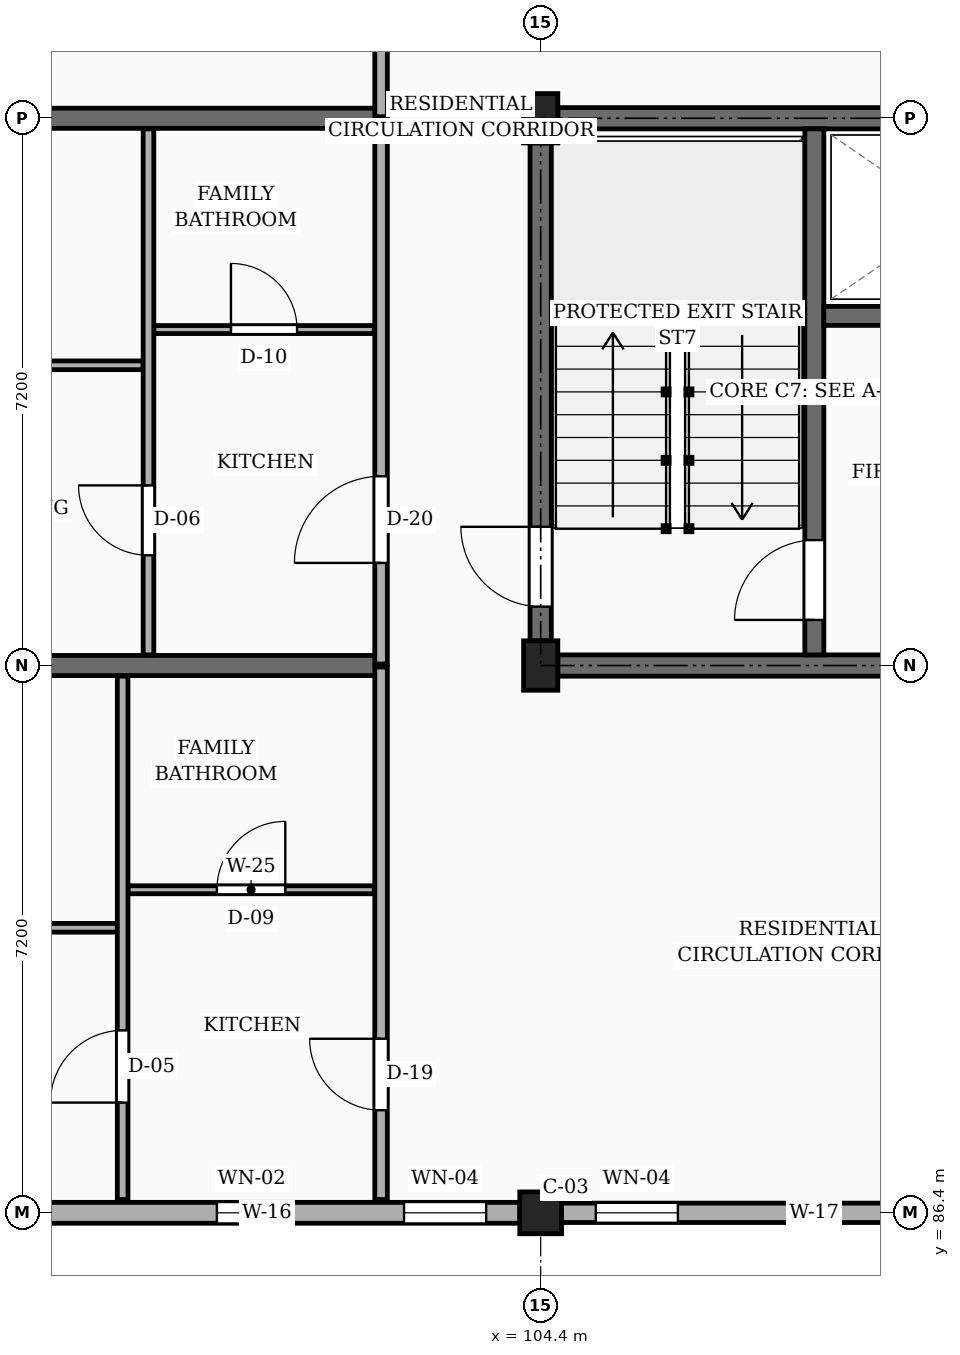
"""IFC4 building model, lengths in metres.
Left out: names, types, materials, properties, quantities, classifications, styles, units other than length and angle.
Written with IfcOpenShell. Run it as: python <this file> out.ifc"""

import sys

from ifc_helpers import new_model, si_unit, direction, frame, frame_2d, origin, origin_2d, place, context, subcontext, project, spatial, rectangle, extrude, element, fill, save


model = new_model("IFC4")
c1 = context("Model", 3, precision=1e-05, world=origin(), true_north=direction((0.0, 1.0)))
c2 = subcontext(c1, "Body", "Model", "MODEL_VIEW")
j1 = project(units=[si_unit("LENGTHUNIT", "METRE"), si_unit("PLANEANGLEUNIT", "RADIAN")], contexts=[c1])
p1 = place(None, origin())
s1 = spatial("IfcSite", under=j1, at=p1, CompositionType="ELEMENT")
p2 = place(p1, origin())
s2 = spatial("IfcBuilding", under=s1, at=p2, CompositionType="ELEMENT")
p3 = place(p2, frame((0.0, 0.0, 10.8)))
s3 = spatial("IfcBuildingStorey", under=s2, at=p3, CompositionType="ELEMENT", Elevation=10.8)
p4 = place(p3, frame((104.4, 86.4, 0.0), z_axis=(0.0, 0.0, 1.0), x_axis=(1.0, 0.0, 0.0)))
e1 = element("IfcColumn", 1, at=p4, inside=s3, PredefinedType="COLUMN", context=c2, shape_type="SweptSolid", body=[
    extrude(rectangle(XDim=0.55, YDim=0.55, at=origin_2d()), origin(), (0.0, 0.0, 1.0), 3.15),
])
for number, where, z_axis, x_axis in (
    (2, (104.4, 93.6, 0.0), (0.0, 0.0, 1.0), (1.0, 0.0, 0.0)),
    (3, (104.4, 100.8, 0.0), (0.0, 0.0, 1.0), (1.0, 0.0, 0.0)),
):
    element("IfcColumn", number, at=place(p3, frame(where, z_axis=z_axis, x_axis=x_axis)), inside=s3, PredefinedType="COLUMN", context=c2, shape_type="SweptSolid", body=[
        extrude(rectangle(XDim=0.45, YDim=0.65, at=origin_2d()), origin(), (0.0, 0.0, 1.0), 3.15),
    ])
for number, where, z_axis, x_axis in (
    (4, (90.275, 93.6, 0.0), (0.0, 0.0, 1.0), (1.0, 0.0, 0.0)),
    (5, (90.275, 100.8, 0.0), (0.0, 0.0, 1.0), (1.0, 0.0, 0.0)),
):
    element("IfcWall", number, at=place(p3, frame(where, z_axis=z_axis, x_axis=x_axis)), inside=s3, PredefinedType="SOLIDWALL", context=c2, shape_type="SweptSolid", body=[
        extrude(rectangle(XDim=12.025, YDim=0.265, at=frame_2d((6.013, 0.0))), origin(), (0.0, 0.0, 1.0), 2.19),
    ])
p5 = place(p3, frame((97.475, 86.4, 0.0), z_axis=(0.0, 0.0, 1.0), x_axis=(1.0, 0.0, 0.0)))
e6 = element("IfcWall", 6, at=p5, inside=s3, PredefinedType="SOLIDWALL", context=c2, shape_type="SweptSolid", body=[
    extrude(rectangle(XDim=6.65, YDim=0.275, at=frame_2d((3.325, 0.0))), origin(), (0.0, 0.0, 1.0), 2.46),
])
p6 = place(p5, frame((2.665, 0.0, 0.78)))
e7 = element("IfcOpeningElement", 7, at=p6, cuts=e6, PredefinedType="OPENING", context=c2, shape_type="SweptSolid", body=[
    extrude(rectangle(XDim=0.92, YDim=1.15, at=frame_2d((0.46, 0.575))), frame((0.0, 0.147, 0.0), z_axis=(0.0, -1.0, 0.0), x_axis=(1.0, 0.0, 0.0)), (0.0, 0.0, 1.0), 0.295),
])
p7 = place(p5, frame((5.127, 0.0, 0.78)))
e8 = element("IfcOpeningElement", 8, at=p7, cuts=e6, PredefinedType="OPENING", context=c2, shape_type="SweptSolid", body=[
    extrude(rectangle(XDim=1.08, YDim=1.15, at=frame_2d((0.54, 0.575))), frame((0.0, 0.147, 0.0), z_axis=(0.0, -1.0, 0.0), x_axis=(1.0, 0.0, 0.0)), (0.0, 0.0, 1.0), 0.295),
])
p8 = place(p3, frame((104.675, 86.4, 0.0), z_axis=(0.0, 0.0, 1.0), x_axis=(1.0, 0.0, 0.0)))
e9 = element("IfcWall", 9, at=p8, inside=s3, PredefinedType="SOLIDWALL", context=c2, shape_type="SweptSolid", body=[
    extrude(rectangle(XDim=6.65, YDim=0.255, at=frame_2d((3.325, 0.0))), origin(), (0.0, 0.0, 1.0), 2.46),
])
p9 = place(p8, frame((0.45, 0.0, 0.78)))
e10 = element("IfcOpeningElement", 10, at=p9, cuts=e9, PredefinedType="OPENING", context=c2, shape_type="SweptSolid", body=[
    extrude(rectangle(XDim=1.08, YDim=1.15, at=frame_2d((0.54, 0.575))), frame((0.0, 0.137, 0.0), z_axis=(0.0, -1.0, 0.0), x_axis=(1.0, 0.0, 0.0)), (0.0, 0.0, 1.0), 0.275),
])
p10 = place(p8, frame((4.65, 0.0, 0.78)))
e11 = element("IfcOpeningElement", 11, at=p10, cuts=e9, PredefinedType="OPENING", context=c2, shape_type="SweptSolid", body=[
    extrude(rectangle(XDim=1.24, YDim=1.15, at=frame_2d((0.62, 0.575))), frame((0.0, 0.137, 0.0), z_axis=(0.0, -1.0, 0.0), x_axis=(1.0, 0.0, 0.0)), (0.0, 0.0, 1.0), 0.275),
])
p11 = place(p3, frame((104.4, 93.925, 0.0), z_axis=(0.0, 0.0, 1.0), x_axis=(0.0, 1.0, 0.0)))
e12 = element("IfcWall", 12, at=p11, inside=s3, PredefinedType="SHEAR", context=c2, shape_type="SweptSolid", body=[
    extrude(rectangle(XDim=6.55, YDim=0.28, at=frame_2d((3.275, 0.0))), origin(), (0.0, 0.0, 1.0), 2.89),
])
p12 = place(p11, frame((0.45, 0.0, 0.0)))
e13 = element("IfcOpeningElement", 13, at=p12, cuts=e12, PredefinedType="OPENING", context=c2, shape_type="SweptSolid", body=[
    extrude(rectangle(XDim=1.05, YDim=2.15, at=frame_2d((0.525, 1.075))), frame((0.0, 0.15, 0.0), z_axis=(0.0, -1.0, 0.0), x_axis=(1.0, 0.0, 0.0)), (0.0, 0.0, 1.0), 0.3),
])
p13 = place(p3, frame((104.625, 100.8, 0.0), z_axis=(0.0, 0.0, 1.0), x_axis=(1.0, 0.0, 0.0)))
e14 = element("IfcWall", 14, at=p13, inside=s3, PredefinedType="SHEAR", context=c2, shape_type="SweptSolid", body=[
    extrude(rectangle(XDim=6.75, YDim=0.28, at=frame_2d((3.375, 0.0))), origin(), (0.0, 0.0, 1.0), 2.89),
])
p14 = place(p3, frame((104.625, 93.6, 0.0), z_axis=(0.0, 0.0, 1.0), x_axis=(1.0, 0.0, 0.0)))
e15 = element("IfcWall", 15, at=p14, inside=s3, PredefinedType="SHEAR", context=c2, shape_type="SweptSolid", body=[
    extrude(rectangle(XDim=6.75, YDim=0.28, at=frame_2d((3.375, 0.0))), origin(), (0.0, 0.0, 1.0), 2.89),
])
p15 = place(p14, frame((4.525, 0.0, 0.0)))
e16 = element("IfcOpeningElement", 16, at=p15, cuts=e15, PredefinedType="OPENING", context=c2, shape_type="SweptSolid", body=[
    extrude(rectangle(XDim=1.1, YDim=2.15, at=frame_2d((0.55, 1.075))), frame((0.0, 0.15, 0.0), z_axis=(0.0, -1.0, 0.0), x_axis=(1.0, 0.0, 0.0)), (0.0, 0.0, 1.0), 0.3),
])
p16 = place(p3, frame((108.0, 93.74, 0.0), z_axis=(0.0, 0.0, 1.0), x_axis=(0.0, 1.0, 0.0)))
e17 = element("IfcWall", 17, at=p16, inside=s3, PredefinedType="SHEAR", context=c2, shape_type="SweptSolid", body=[
    extrude(rectangle(XDim=6.92, YDim=0.25, at=frame_2d((3.46, 0.0))), origin(), (0.0, 0.0, 1.0), 2.89),
])
p17 = place(p16, frame((0.46, 0.0, 0.0)))
e18 = element("IfcOpeningElement", 18, at=p17, cuts=e17, PredefinedType="OPENING", context=c2, shape_type="SweptSolid", body=[
    extrude(rectangle(XDim=1.05, YDim=2.15, at=frame_2d((0.525, 1.075))), frame((0.0, 0.135, 0.0), z_axis=(0.0, -1.0, 0.0), x_axis=(1.0, 0.0, 0.0)), (0.0, 0.0, 1.0), 0.27),
])
p18 = place(p3, frame((108.125, 98.2, 0.0), z_axis=(0.0, 0.0, 1.0), x_axis=(1.0, 0.0, 0.0)))
e19 = element("IfcWall", 19, at=p18, inside=s3, PredefinedType="SHEAR", context=c2, shape_type="SweptSolid", body=[
    extrude(rectangle(XDim=3.335, YDim=0.25, at=frame_2d((1.667, 0.0))), origin(), (0.0, 0.0, 1.0), 2.89),
])
p19 = place(p18, frame((1.1, 0.0, 0.0)))
e20 = element("IfcOpeningElement", 20, at=p19, cuts=e19, PredefinedType="OPENING", context=c2, shape_type="SweptSolid", body=[
    extrude(rectangle(XDim=1.1, YDim=2.2, at=frame_2d((0.55, 1.1))), frame((0.0, 0.135, 0.0), z_axis=(0.0, -1.0, 0.0), x_axis=(1.0, 0.0, 0.0)), (0.0, 0.0, 1.0), 0.27),
])
p20 = place(p3, frame((102.3, 86.575, 0.0), z_axis=(0.0, 0.0, 1.0), x_axis=(0.0, 1.0, 0.0)))
e21 = element("IfcWall", 21, at=p20, inside=s3, PredefinedType="PARTITIONING", context=c2, shape_type="SweptSolid", body=[
    extrude(rectangle(XDim=7.005, YDim=0.165, at=frame_2d((3.502, 0.0))), origin(), (0.0, 0.0, 1.0), 2.325),
])
p21 = place(p20, frame((1.175, 0.0, 0.0)))
e22 = element("IfcOpeningElement", 22, at=p21, cuts=e21, PredefinedType="OPENING", context=c2, shape_type="SweptSolid", body=[
    extrude(rectangle(XDim=0.94, YDim=2.12, at=frame_2d((0.47, 1.06))), frame((0.0, 0.093, 0.0), z_axis=(0.0, -1.0, 0.0), x_axis=(1.0, 0.0, 0.0)), (0.0, 0.0, 1.0), 0.185),
])
p22 = place(p3, frame((102.3, 93.62, 0.0), z_axis=(0.0, 0.0, 1.0), x_axis=(0.0, 1.0, 0.0)))
e23 = element("IfcWall", 23, at=p22, inside=s3, PredefinedType="PARTITIONING", context=c2, shape_type="SweptSolid", body=[
    extrude(rectangle(XDim=7.16, YDim=0.165, at=frame_2d((3.58, 0.0))), origin(), (0.0, 0.0, 1.0), 2.325),
])
p23 = place(p22, frame((1.33, 0.0, 0.0)))
e24 = element("IfcOpeningElement", 24, at=p23, cuts=e23, PredefinedType="OPENING", context=c2, shape_type="SweptSolid", body=[
    extrude(rectangle(XDim=1.14, YDim=2.18, at=frame_2d((0.57, 1.09))), frame((0.0, 0.093, 0.0), z_axis=(0.0, -1.0, 0.0), x_axis=(1.0, 0.0, 0.0)), (0.0, 0.0, 1.0), 0.185),
])
p24 = place(p3, frame((102.3, 100.82, 0.0), z_axis=(0.0, 0.0, 1.0), x_axis=(0.0, 1.0, 0.0)))
e25 = element("IfcWall", 25, at=p24, inside=s3, PredefinedType="PARTITIONING", context=c2, shape_type="SweptSolid", body=[
    extrude(rectangle(XDim=7.16, YDim=0.165, at=frame_2d((3.58, 0.0))), origin(), (0.0, 0.0, 1.0), 2.325),
])
p25 = place(p24, frame((4.78, 0.0, 0.0)))
e26 = element("IfcOpeningElement", 26, at=p25, cuts=e25, PredefinedType="OPENING", context=c2, shape_type="SweptSolid", body=[
    extrude(rectangle(XDim=1.0, YDim=2.15, at=frame_2d((0.5, 1.075))), frame((0.0, 0.093, 0.0), z_axis=(0.0, -1.0, 0.0), x_axis=(1.0, 0.0, 0.0)), (0.0, 0.0, 1.0), 0.185),
])
p26 = place(p3, frame((90.175, 90.15, 0.0), z_axis=(0.0, 0.0, 1.0), x_axis=(1.0, 0.0, 0.0)))
e27 = element("IfcWall", 27, at=p26, inside=s3, PredefinedType="PARTITIONING", context=c2, shape_type="SweptSolid", body=[
    extrude(rectangle(XDim=8.655, YDim=0.115, at=frame_2d((4.328, 0.0))), origin(), (0.0, 0.0, 1.0), 2.325),
])
p27 = place(p26, frame((3.877, 0.0, 0.0)))
e28 = element("IfcOpeningElement", 28, at=p27, cuts=e27, PredefinedType="OPENING", context=c2, shape_type="SweptSolid", body=[
    extrude(rectangle(XDim=0.9, YDim=2.1, at=frame_2d((0.45, 1.05))), frame((0.0, 0.067, 0.0), z_axis=(0.0, -1.0, 0.0), x_axis=(1.0, 0.0, 0.0)), (0.0, 0.0, 1.0), 0.135),
])
p28 = place(p3, frame((98.97, 90.65, 0.0), z_axis=(0.0, 0.0, 1.0), x_axis=(1.0, 0.0, 0.0)))
e29 = element("IfcWall", 29, at=p28, inside=s3, PredefinedType="PARTITIONING", context=c2, shape_type="SweptSolid", body=[
    extrude(rectangle(XDim=3.24, YDim=0.105, at=frame_2d((1.62, 0.0))), origin(), (0.0, 0.0, 1.0), 2.325),
])
p29 = place(p28, frame((1.17, 0.0, 0.0)))
e30 = element("IfcOpeningElement", 30, at=p29, cuts=e29, PredefinedType="OPENING", context=c2, shape_type="SweptSolid", body=[
    extrude(rectangle(XDim=0.9, YDim=2.05, at=frame_2d((0.45, 1.025))), frame((0.0, 0.062, 0.0), z_axis=(0.0, -1.0, 0.0), x_axis=(1.0, 0.0, 0.0)), (0.0, 0.0, 1.0), 0.125),
])
p30 = place(p3, frame((98.9, 86.575, 0.0), z_axis=(0.0, 0.0, 1.0), x_axis=(0.0, 1.0, 0.0)))
e31 = element("IfcWall", 31, at=p30, inside=s3, PredefinedType="PARTITIONING", context=c2, shape_type="SweptSolid", body=[
    extrude(rectangle(XDim=6.885, YDim=0.14, at=frame_2d((3.442, 0.0))), origin(), (0.0, 0.0, 1.0), 2.325),
])
p31 = place(p30, frame((1.275, 0.0, 0.0)))
e32 = element("IfcOpeningElement", 32, at=p31, cuts=e31, PredefinedType="OPENING", context=c2, shape_type="SweptSolid", body=[
    extrude(rectangle(XDim=0.95, YDim=2.1, at=frame_2d((0.475, 1.05))), frame((0.0, 0.08, 0.0), z_axis=(0.0, -1.0, 0.0), x_axis=(1.0, 0.0, 0.0)), (0.0, 0.0, 1.0), 0.16),
])
p32 = place(p3, frame((90.175, 97.55, 0.0), z_axis=(0.0, 0.0, 1.0), x_axis=(1.0, 0.0, 0.0)))
e33 = element("IfcWall", 33, at=p32, inside=s3, PredefinedType="PARTITIONING", context=c2, shape_type="SweptSolid", body=[
    extrude(rectangle(XDim=8.995, YDim=0.115, at=frame_2d((4.498, 0.0))), origin(), (0.0, 0.0, 1.0), 2.325),
])
p33 = place(p32, frame((4.058, 0.0, 0.0)))
e34 = element("IfcOpeningElement", 34, at=p33, cuts=e33, PredefinedType="OPENING", context=c2, shape_type="SweptSolid", body=[
    extrude(rectangle(XDim=0.88, YDim=2.08, at=frame_2d((0.44, 1.04))), frame((0.0, 0.067, 0.0), z_axis=(0.0, -1.0, 0.0), x_axis=(1.0, 0.0, 0.0)), (0.0, 0.0, 1.0), 0.135),
])
p34 = place(p3, frame((99.31, 98.02, 0.0), z_axis=(0.0, 0.0, 1.0), x_axis=(1.0, 0.0, 0.0)))
e35 = element("IfcWall", 35, at=p34, inside=s3, PredefinedType="PARTITIONING", context=c2, shape_type="SweptSolid", body=[
    extrude(rectangle(XDim=2.9, YDim=0.105, at=frame_2d((1.45, 0.0))), origin(), (0.0, 0.0, 1.0), 2.325),
])
p35 = place(p34, frame((1.015, 0.0, 0.0)))
e36 = element("IfcOpeningElement", 36, at=p35, cuts=e35, PredefinedType="OPENING", context=c2, shape_type="SweptSolid", body=[
    extrude(rectangle(XDim=0.87, YDim=2.05, at=frame_2d((0.435, 1.025))), frame((0.0, 0.062, 0.0), z_axis=(0.0, -1.0, 0.0), x_axis=(1.0, 0.0, 0.0)), (0.0, 0.0, 1.0), 0.125),
])
p36 = place(p3, frame((99.24, 93.74, 0.0), z_axis=(0.0, 0.0, 1.0), x_axis=(0.0, 1.0, 0.0)))
e37 = element("IfcWall", 37, at=p36, inside=s3, PredefinedType="PARTITIONING", context=c2, shape_type="SweptSolid", body=[
    extrude(rectangle(XDim=6.92, YDim=0.14, at=frame_2d((3.46, 0.0))), origin(), (0.0, 0.0, 1.0), 2.325),
])
p37 = place(p36, frame((1.31, 0.0, 0.0)))
e38 = element("IfcOpeningElement", 38, at=p37, cuts=e37, PredefinedType="OPENING", context=c2, shape_type="SweptSolid", body=[
    extrude(rectangle(XDim=0.92, YDim=2.1, at=frame_2d((0.46, 1.05))), frame((0.0, 0.08, 0.0), z_axis=(0.0, -1.0, 0.0), x_axis=(1.0, 0.0, 0.0)), (0.0, 0.0, 1.0), 0.16),
])
p38 = place(p6, origin())
e39 = element("IfcWindow", 39, at=p38, inside=s3, PartitioningType="SINGLE_PANEL", PredefinedType="WINDOW", context=c2, shape_type="SweptSolid", body=[
    extrude(rectangle(XDim=0.92, YDim=1.15, at=frame_2d((0.46, 0.575))), frame((0.0, 0.03, 0.0), z_axis=(0.0, -1.0, 0.0), x_axis=(1.0, 0.0, 0.0)), (0.0, 0.0, 1.0), 0.06),
])
fill(e7, e39)
p39 = place(p7, origin())
e40 = element("IfcWindow", 40, at=p39, inside=s3, PartitioningType="SINGLE_PANEL", PredefinedType="WINDOW", context=c2, shape_type="SweptSolid", body=[
    extrude(rectangle(XDim=1.08, YDim=1.15, at=frame_2d((0.54, 0.575))), frame((0.0, 0.03, 0.0), z_axis=(0.0, -1.0, 0.0), x_axis=(1.0, 0.0, 0.0)), (0.0, 0.0, 1.0), 0.06),
])
fill(e8, e40)
p40 = place(p9, origin())
e41 = element("IfcWindow", 41, at=p40, inside=s3, PartitioningType="SINGLE_PANEL", PredefinedType="WINDOW", context=c2, shape_type="SweptSolid", body=[
    extrude(rectangle(XDim=1.08, YDim=1.15, at=frame_2d((0.54, 0.575))), frame((0.0, 0.03, 0.0), z_axis=(0.0, -1.0, 0.0), x_axis=(1.0, 0.0, 0.0)), (0.0, 0.0, 1.0), 0.06),
])
fill(e10, e41)
p41 = place(p12, origin())
e42 = element("IfcDoor", 42, at=p41, inside=s3, OperationType="SINGLE_SWING_RIGHT", PredefinedType="DOOR", context=c2, shape_type="SweptSolid", body=[
    extrude(rectangle(XDim=1.05, YDim=2.15, at=frame_2d((0.525, 1.075))), frame((0.0, 0.025, 0.0), z_axis=(0.0, -1.0, 0.0), x_axis=(1.0, 0.0, 0.0)), (0.0, 0.0, 1.0), 0.05),
])
fill(e13, e42)
p42 = place(p17, origin())
e43 = element("IfcDoor", 43, at=p42, inside=s3, OperationType="SINGLE_SWING_LEFT", PredefinedType="DOOR", context=c2, shape_type="SweptSolid", body=[
    extrude(rectangle(XDim=1.05, YDim=2.15, at=frame_2d((0.525, 1.075))), frame((0.0, 0.025, 0.0), z_axis=(0.0, -1.0, 0.0), x_axis=(1.0, 0.0, 0.0)), (0.0, 0.0, 1.0), 0.05),
])
fill(e18, e43)
p43 = place(p21, origin())
e44 = element("IfcDoor", 44, at=p43, inside=s3, OperationType="SINGLE_SWING_RIGHT", PredefinedType="DOOR", context=c2, shape_type="SweptSolid", body=[
    extrude(rectangle(XDim=0.94, YDim=2.12, at=frame_2d((0.47, 1.06))), frame((0.0, 0.025, 0.0), z_axis=(0.0, -1.0, 0.0), x_axis=(1.0, 0.0, 0.0)), (0.0, 0.0, 1.0), 0.05),
])
fill(e22, e44)
p44 = place(p23, origin())
e45 = element("IfcDoor", 45, at=p44, inside=s3, OperationType="SINGLE_SWING_LEFT", PredefinedType="DOOR", context=c2, shape_type="SweptSolid", body=[
    extrude(rectangle(XDim=1.14, YDim=2.18, at=frame_2d((0.57, 1.09))), frame((0.0, 0.025, 0.0), z_axis=(0.0, -1.0, 0.0), x_axis=(1.0, 0.0, 0.0)), (0.0, 0.0, 1.0), 0.05),
])
fill(e24, e45)
p45 = place(p29, origin())
e46 = element("IfcDoor", 46, at=p45, inside=s3, OperationType="SINGLE_SWING_RIGHT", PredefinedType="DOOR", context=c2, shape_type="SweptSolid", body=[
    extrude(rectangle(XDim=0.9, YDim=2.05, at=frame_2d((0.45, 1.025))), frame((0.0, 0.025, 0.0), z_axis=(0.0, -1.0, 0.0), x_axis=(1.0, 0.0, 0.0)), (0.0, 0.0, 1.0), 0.05),
])
fill(e30, e46)
p46 = place(p31, origin())
e47 = element("IfcDoor", 47, at=p46, inside=s3, OperationType="SINGLE_SWING_LEFT", PredefinedType="DOOR", context=c2, shape_type="SweptSolid", body=[
    extrude(rectangle(XDim=0.95, YDim=2.1, at=frame_2d((0.475, 1.05))), frame((0.0, 0.025, 0.0), z_axis=(0.0, -1.0, 0.0), x_axis=(1.0, 0.0, 0.0)), (0.0, 0.0, 1.0), 0.05),
])
fill(e32, e47)
p47 = place(p35, origin())
e48 = element("IfcDoor", 48, at=p47, inside=s3, OperationType="SINGLE_SWING_LEFT", PredefinedType="DOOR", context=c2, shape_type="SweptSolid", body=[
    extrude(rectangle(XDim=0.87, YDim=2.05, at=frame_2d((0.435, 1.025))), frame((0.0, 0.025, 0.0), z_axis=(0.0, -1.0, 0.0), x_axis=(1.0, 0.0, 0.0)), (0.0, 0.0, 1.0), 0.05),
])
fill(e36, e48)
p48 = place(p37, origin())
e49 = element("IfcDoor", 49, at=p48, inside=s3, OperationType="SINGLE_SWING_RIGHT", PredefinedType="DOOR", context=c2, shape_type="SweptSolid", body=[
    extrude(rectangle(XDim=0.92, YDim=2.1, at=frame_2d((0.46, 1.05))), frame((0.0, 0.025, 0.0), z_axis=(0.0, -1.0, 0.0), x_axis=(1.0, 0.0, 0.0)), (0.0, 0.0, 1.0), 0.05),
])
fill(e38, e49)
save(model, sys.argv[1])
